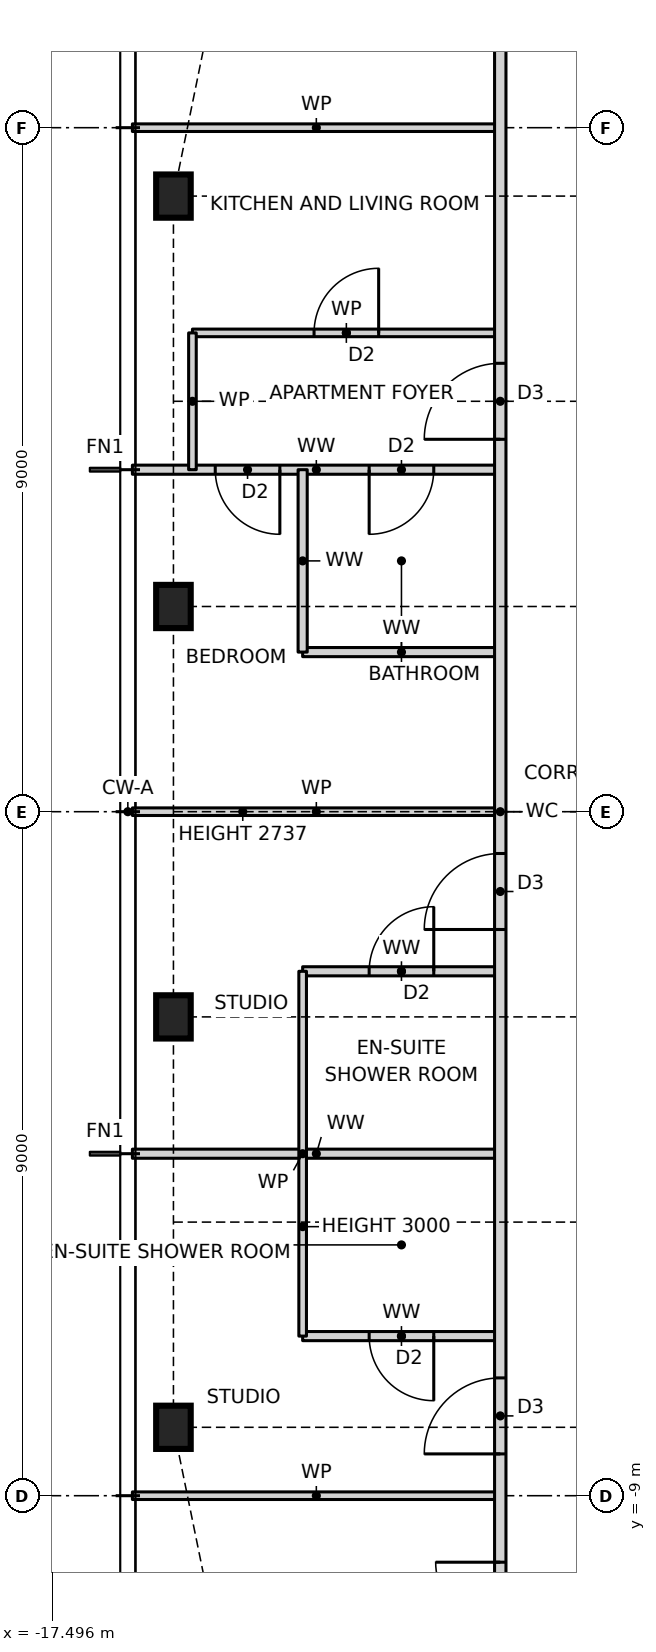
"""IFC4 building model, lengths in metres.
Left out: names, types, materials, properties, quantities, classifications, styles, units other than length and angle.
Written with IfcOpenShell. Run it as: python <this file> out.ifc"""

import sys

from ifc_helpers import new_model, si_unit, direction, frame, frame_2d, origin, origin_2d, place, context, subcontext, project, spatial, rectangle, i_section, extrude, element, fill, save


model = new_model("IFC4")
c1 = context("Model", 3, precision=1e-05, world=origin(), true_north=direction((0.0, 1.0)))
c2 = subcontext(c1, "Body", "Model", "MODEL_VIEW")
j1 = project(units=[si_unit("LENGTHUNIT", "METRE"), si_unit("PLANEANGLEUNIT", "RADIAN")], contexts=[c1])
p1 = place(None, origin())
s1 = spatial("IfcSite", under=j1, at=p1, CompositionType="ELEMENT")
p2 = place(p1, origin())
s2 = spatial("IfcBuilding", under=s1, at=p2, CompositionType="ELEMENT")
p3 = place(p2, frame((0.0, 0.0, 222.0)))
s3 = spatial("IfcBuildingStorey", under=s2, at=p3, CompositionType="ELEMENT", Elevation=222.0)
for number, where, z_axis, x_axis in (
    (1, (-15.9, 8.1, 0.0), (0.0, 0.0, 1.0), (1.0, 0.0, 0.0)),
    (2, (-15.9, 2.7, 0.0), (0.0, 0.0, 1.0), (1.0, 0.0, 0.0)),
    (3, (-15.9, -2.7, 0.0), (0.0, 0.0, 1.0), (1.0, 0.0, 0.0)),
    (4, (-15.9, -8.1, 0.0), (0.0, 0.0, 1.0), (1.0, 0.0, 0.0)),
):
    element("IfcColumn", number, at=place(p3, frame(where, z_axis=z_axis, x_axis=x_axis)), inside=s3, PredefinedType="COLUMN", context=c2, shape_type="SweptSolid", body=[
        extrude(i_section(OverallWidth=0.455, OverallDepth=0.569, WebThickness=0.078, FlangeThickness=0.125, at=origin_2d()), origin(), (0.0, 0.0, 1.0), 3.5),
    ])
p4 = place(p3, frame((-16.44, -9.0, 0.0), z_axis=(0.0, 0.0, 1.0), x_axis=(1.0, 0.0, 0.0)))
e5 = element("IfcWall", 5, at=p4, inside=s3, PredefinedType="PARTITIONING", context=c2, shape_type="SweptSolid", body=[
    extrude(rectangle(XDim=4.84, YDim=0.1, at=frame_2d((2.42, 0.0))), origin(), (0.0, 0.0, 1.0), 3.27),
])
p5 = place(p3, frame((-14.2, -6.9, 0.0), z_axis=(0.0, 0.0, 1.0), x_axis=(1.0, 0.0, 0.0)))
e6 = element("IfcWall", 6, at=p5, inside=s3, PredefinedType="PARTITIONING", context=c2, shape_type="SweptSolid", body=[
    extrude(rectangle(XDim=2.6, YDim=0.12, at=frame_2d((1.3, 0.0))), origin(), (0.0, 0.0, 1.0), 3.27),
])
p6 = place(p5, frame((0.875, 0.0, 0.0)))
e7 = element("IfcOpeningElement", 7, at=p6, cuts=e6, PredefinedType="OPENING", context=c2, shape_type="SweptSolid", body=[
    extrude(rectangle(XDim=0.85, YDim=2.1, at=frame_2d((0.425, 1.05))), frame((0.0, 0.07, 0.0), z_axis=(0.0, -1.0, 0.0), x_axis=(1.0, 0.0, 0.0)), (0.0, 0.0, 1.0), 0.14),
])
p7 = place(p3, frame((-16.44, -4.5, 0.0), z_axis=(0.0, 0.0, 1.0), x_axis=(1.0, 0.0, 0.0)))
e8 = element("IfcWall", 8, at=p7, inside=s3, PredefinedType="PARTITIONING", context=c2, shape_type="SweptSolid", body=[
    extrude(rectangle(XDim=4.84, YDim=0.12, at=frame_2d((2.42, 0.0))), origin(), (0.0, 0.0, 1.0), 3.27),
])
p8 = place(p3, frame((-14.2, -2.1, 0.0), z_axis=(0.0, 0.0, 1.0), x_axis=(1.0, 0.0, 0.0)))
e9 = element("IfcWall", 9, at=p8, inside=s3, PredefinedType="PARTITIONING", context=c2, shape_type="SweptSolid", body=[
    extrude(rectangle(XDim=2.6, YDim=0.12, at=frame_2d((1.3, 0.0))), origin(), (0.0, 0.0, 1.0), 3.27),
])
p9 = place(p8, frame((0.875, 0.0, 0.0)))
e10 = element("IfcOpeningElement", 10, at=p9, cuts=e9, PredefinedType="OPENING", context=c2, shape_type="SweptSolid", body=[
    extrude(rectangle(XDim=0.85, YDim=2.1, at=frame_2d((0.425, 1.05))), frame((0.0, 0.07, 0.0), z_axis=(0.0, -1.0, 0.0), x_axis=(1.0, 0.0, 0.0)), (0.0, 0.0, 1.0), 0.14),
])
p10 = place(p3, frame((-16.44, 0.0, 0.0), z_axis=(0.0, 0.0, 1.0), x_axis=(1.0, 0.0, 0.0)))
e11 = element("IfcWall", 11, at=p10, inside=s3, PredefinedType="PARTITIONING", context=c2, shape_type="SweptSolid", body=[
    extrude(rectangle(XDim=4.84, YDim=0.1, at=frame_2d((2.42, 0.0))), origin(), (0.0, 0.0, 1.0), 2.737),
])
p11 = place(p3, frame((-14.2, 2.1, 0.0), z_axis=(0.0, 0.0, 1.0), x_axis=(1.0, 0.0, 0.0)))
e12 = element("IfcWall", 12, at=p11, inside=s3, PredefinedType="PARTITIONING", context=c2, shape_type="SweptSolid", body=[
    extrude(rectangle(XDim=2.6, YDim=0.12, at=frame_2d((1.3, 0.0))), origin(), (0.0, 0.0, 1.0), 3.27),
])
p12 = place(p3, frame((-16.44, 4.5, 0.0), z_axis=(0.0, 0.0, 1.0), x_axis=(1.0, 0.0, 0.0)))
e13 = element("IfcWall", 13, at=p12, inside=s3, PredefinedType="PARTITIONING", context=c2, shape_type="SweptSolid", body=[
    extrude(rectangle(XDim=4.84, YDim=0.12, at=frame_2d((2.42, 0.0))), origin(), (0.0, 0.0, 1.0), 3.27),
])
p13 = place(p12, frame((1.09, 0.0, 0.0)))
e14 = element("IfcOpeningElement", 14, at=p13, cuts=e13, PredefinedType="OPENING", context=c2, shape_type="SweptSolid", body=[
    extrude(rectangle(XDim=0.85, YDim=2.1, at=frame_2d((0.425, 1.05))), frame((0.0, 0.07, 0.0), z_axis=(0.0, -1.0, 0.0), x_axis=(1.0, 0.0, 0.0)), (0.0, 0.0, 1.0), 0.14),
])
p14 = place(p12, frame((3.115, 0.0, 0.0)))
e15 = element("IfcOpeningElement", 15, at=p14, cuts=e13, PredefinedType="OPENING", context=c2, shape_type="SweptSolid", body=[
    extrude(rectangle(XDim=0.85, YDim=2.1, at=frame_2d((0.425, 1.05))), frame((0.0, 0.07, 0.0), z_axis=(0.0, -1.0, 0.0), x_axis=(1.0, 0.0, 0.0)), (0.0, 0.0, 1.0), 0.14),
])
p15 = place(p3, frame((-15.65, 6.3, 0.0), z_axis=(0.0, 0.0, 1.0), x_axis=(1.0, 0.0, 0.0)))
e16 = element("IfcWall", 16, at=p15, inside=s3, PredefinedType="PARTITIONING", context=c2, shape_type="SweptSolid", body=[
    extrude(rectangle(XDim=4.05, YDim=0.1, at=frame_2d((2.025, 0.0))), origin(), (0.0, 0.0, 1.0), 3.27),
])
p16 = place(p15, frame((1.6, 0.0, 0.0)))
e17 = element("IfcOpeningElement", 17, at=p16, cuts=e16, PredefinedType="OPENING", context=c2, shape_type="SweptSolid", body=[
    extrude(rectangle(XDim=0.85, YDim=2.1, at=frame_2d((0.425, 1.05))), frame((0.0, 0.06, 0.0), z_axis=(0.0, -1.0, 0.0), x_axis=(1.0, 0.0, 0.0)), (0.0, 0.0, 1.0), 0.12),
])
p17 = place(p3, frame((-16.44, 9.0, 0.0), z_axis=(0.0, 0.0, 1.0), x_axis=(1.0, 0.0, 0.0)))
e18 = element("IfcWall", 18, at=p17, inside=s3, PredefinedType="PARTITIONING", context=c2, shape_type="SweptSolid", body=[
    extrude(rectangle(XDim=4.84, YDim=0.1, at=frame_2d((2.42, 0.0))), origin(), (0.0, 0.0, 1.0), 3.27),
])
p18 = place(p3, frame((-11.6, -11.6, 0.0), z_axis=(0.0, 0.0, 1.0), x_axis=(0.0, 1.0, 0.0)))
e19 = element("IfcWall", 19, at=p18, inside=s3, PredefinedType="PARTITIONING", context=c2, shape_type="SweptSolid", body=[
    extrude(rectangle(XDim=23.2, YDim=0.15, at=frame_2d((11.6, 0.0))), origin(), (0.0, 0.0, 1.0), 3.27),
])
p19 = place(p18, frame((16.5, 0.0, 0.0)))
e20 = element("IfcOpeningElement", 20, at=p19, cuts=e19, PredefinedType="OPENING", context=c2, shape_type="SweptSolid", body=[
    extrude(rectangle(XDim=1.0, YDim=2.1, at=frame_2d((0.5, 1.05))), frame((0.0, 0.085, 0.0), z_axis=(0.0, -1.0, 0.0), x_axis=(1.0, 0.0, 0.0)), (0.0, 0.0, 1.0), 0.17),
])
p20 = place(p18, frame((10.05, 0.0, 0.0)))
e21 = element("IfcOpeningElement", 21, at=p20, cuts=e19, PredefinedType="OPENING", context=c2, shape_type="SweptSolid", body=[
    extrude(rectangle(XDim=1.0, YDim=2.1, at=frame_2d((0.5, 1.05))), frame((0.0, 0.085, 0.0), z_axis=(0.0, -1.0, 0.0), x_axis=(1.0, 0.0, 0.0)), (0.0, 0.0, 1.0), 0.17),
])
p21 = place(p18, frame((3.15, 0.0, 0.0)))
e22 = element("IfcOpeningElement", 22, at=p21, cuts=e19, PredefinedType="OPENING", context=c2, shape_type="SweptSolid", body=[
    extrude(rectangle(XDim=1.0, YDim=2.1, at=frame_2d((0.5, 1.05))), frame((0.0, 0.085, 0.0), z_axis=(0.0, -1.0, 0.0), x_axis=(1.0, 0.0, 0.0)), (0.0, 0.0, 1.0), 0.17),
])
p22 = place(p18, frame((0.875, 0.0, 0.0)))
e23 = element("IfcOpeningElement", 23, at=p22, cuts=e19, PredefinedType="OPENING", context=c2, shape_type="SweptSolid", body=[
    extrude(rectangle(XDim=0.85, YDim=2.1, at=frame_2d((0.425, 1.05))), frame((0.0, 0.085, 0.0), z_axis=(0.0, -1.0, 0.0), x_axis=(1.0, 0.0, 0.0)), (0.0, 0.0, 1.0), 0.17),
])
p23 = place(p3, frame((-14.2, -6.9, 0.0), z_axis=(0.0, 0.0, 1.0), x_axis=(0.0, 1.0, 0.0)))
e24 = element("IfcWall", 24, at=p23, inside=s3, PredefinedType="PARTITIONING", context=c2, shape_type="SweptSolid", body=[
    extrude(rectangle(XDim=4.8, YDim=0.1, at=frame_2d((2.4, 0.0))), origin(), (0.0, 0.0, 1.0), 3.0),
])
p24 = place(p3, frame((-14.2, 2.1, 0.0), z_axis=(0.0, 0.0, 1.0), x_axis=(0.0, 1.0, 0.0)))
e25 = element("IfcWall", 25, at=p24, inside=s3, PredefinedType="PARTITIONING", context=c2, shape_type="SweptSolid", body=[
    extrude(rectangle(XDim=2.4, YDim=0.12, at=frame_2d((1.2, 0.0))), origin(), (0.0, 0.0, 1.0), 3.27),
])
p25 = place(p3, frame((-15.65, 4.5, 0.0), z_axis=(0.0, 0.0, 1.0), x_axis=(0.0, 1.0, 0.0)))
e26 = element("IfcWall", 26, at=p25, inside=s3, PredefinedType="PARTITIONING", context=c2, shape_type="SweptSolid", body=[
    extrude(rectangle(XDim=1.8, YDim=0.1, at=frame_2d((0.9, 0.0))), origin(), (0.0, 0.0, 1.0), 3.27),
])
p26 = place(p19, origin())
e27 = element("IfcDoor", 27, at=p26, inside=s3, OperationType="SINGLE_SWING_LEFT", PredefinedType="DOOR", context=c2, shape_type="SweptSolid", body=[
    extrude(rectangle(XDim=1.0, YDim=2.1, at=frame_2d((0.5, 1.05))), frame((0.0, 0.025, 0.0), z_axis=(0.0, -1.0, 0.0), x_axis=(1.0, 0.0, 0.0)), (0.0, 0.0, 1.0), 0.05),
])
fill(e20, e27)
p27 = place(p16, origin())
e28 = element("IfcDoor", 28, at=p27, inside=s3, OperationType="SINGLE_SWING_RIGHT", PredefinedType="DOOR", context=c2, shape_type="SweptSolid", body=[
    extrude(rectangle(XDim=0.85, YDim=2.1, at=frame_2d((0.425, 1.05))), frame((0.0, 0.025, 0.0), z_axis=(0.0, -1.0, 0.0), x_axis=(1.0, 0.0, 0.0)), (0.0, 0.0, 1.0), 0.05),
])
fill(e17, e28)
p28 = place(p13, frame((0.85, 0.0, 0.0), z_axis=(0.0, 0.0, 1.0), x_axis=(-1.0, 0.0, 0.0)))
e29 = element("IfcDoor", 29, at=p28, inside=s3, OperationType="SINGLE_SWING_LEFT", PredefinedType="DOOR", context=c2, shape_type="SweptSolid", body=[
    extrude(rectangle(XDim=0.85, YDim=2.1, at=frame_2d((0.425, 1.05))), frame((0.0, 0.025, 0.0), z_axis=(0.0, -1.0, 0.0), x_axis=(1.0, 0.0, 0.0)), (0.0, 0.0, 1.0), 0.05),
])
fill(e14, e29)
p29 = place(p14, frame((0.85, 0.0, 0.0), z_axis=(0.0, 0.0, 1.0), x_axis=(-1.0, 0.0, 0.0)))
e30 = element("IfcDoor", 30, at=p29, inside=s3, OperationType="SINGLE_SWING_RIGHT", PredefinedType="DOOR", context=c2, shape_type="SweptSolid", body=[
    extrude(rectangle(XDim=0.85, YDim=2.1, at=frame_2d((0.425, 1.05))), frame((0.0, 0.025, 0.0), z_axis=(0.0, -1.0, 0.0), x_axis=(1.0, 0.0, 0.0)), (0.0, 0.0, 1.0), 0.05),
])
fill(e15, e30)
p30 = place(p20, origin())
e31 = element("IfcDoor", 31, at=p30, inside=s3, OperationType="SINGLE_SWING_LEFT", PredefinedType="DOOR", context=c2, shape_type="SweptSolid", body=[
    extrude(rectangle(XDim=1.0, YDim=2.1, at=frame_2d((0.5, 1.05))), frame((0.0, 0.025, 0.0), z_axis=(0.0, -1.0, 0.0), x_axis=(1.0, 0.0, 0.0)), (0.0, 0.0, 1.0), 0.05),
])
fill(e21, e31)
p31 = place(p9, origin())
e32 = element("IfcDoor", 32, at=p31, inside=s3, OperationType="SINGLE_SWING_RIGHT", PredefinedType="DOOR", context=c2, shape_type="SweptSolid", body=[
    extrude(rectangle(XDim=0.85, YDim=2.1, at=frame_2d((0.425, 1.05))), frame((0.0, 0.025, 0.0), z_axis=(0.0, -1.0, 0.0), x_axis=(1.0, 0.0, 0.0)), (0.0, 0.0, 1.0), 0.05),
])
fill(e10, e32)
p32 = place(p21, origin())
e33 = element("IfcDoor", 33, at=p32, inside=s3, OperationType="SINGLE_SWING_LEFT", PredefinedType="DOOR", context=c2, shape_type="SweptSolid", body=[
    extrude(rectangle(XDim=1.0, YDim=2.1, at=frame_2d((0.5, 1.05))), frame((0.0, 0.025, 0.0), z_axis=(0.0, -1.0, 0.0), x_axis=(1.0, 0.0, 0.0)), (0.0, 0.0, 1.0), 0.05),
])
fill(e22, e33)
p33 = place(p6, frame((0.85, 0.0, 0.0), z_axis=(0.0, 0.0, 1.0), x_axis=(-1.0, 0.0, 0.0)))
e34 = element("IfcDoor", 34, at=p33, inside=s3, OperationType="SINGLE_SWING_LEFT", PredefinedType="DOOR", context=c2, shape_type="SweptSolid", body=[
    extrude(rectangle(XDim=0.85, YDim=2.1, at=frame_2d((0.425, 1.05))), frame((0.0, 0.025, 0.0), z_axis=(0.0, -1.0, 0.0), x_axis=(1.0, 0.0, 0.0)), (0.0, 0.0, 1.0), 0.05),
])
fill(e7, e34)
p34 = place(p22, origin())
e35 = element("IfcDoor", 35, at=p34, inside=s3, OperationType="SINGLE_SWING_RIGHT", PredefinedType="DOOR", context=c2, shape_type="SweptSolid", body=[
    extrude(rectangle(XDim=0.85, YDim=2.1, at=frame_2d((0.425, 1.05))), frame((0.0, 0.025, 0.0), z_axis=(0.0, -1.0, 0.0), x_axis=(1.0, 0.0, 0.0)), (0.0, 0.0, 1.0), 0.05),
])
fill(e23, e35)
save(model, sys.argv[1])
